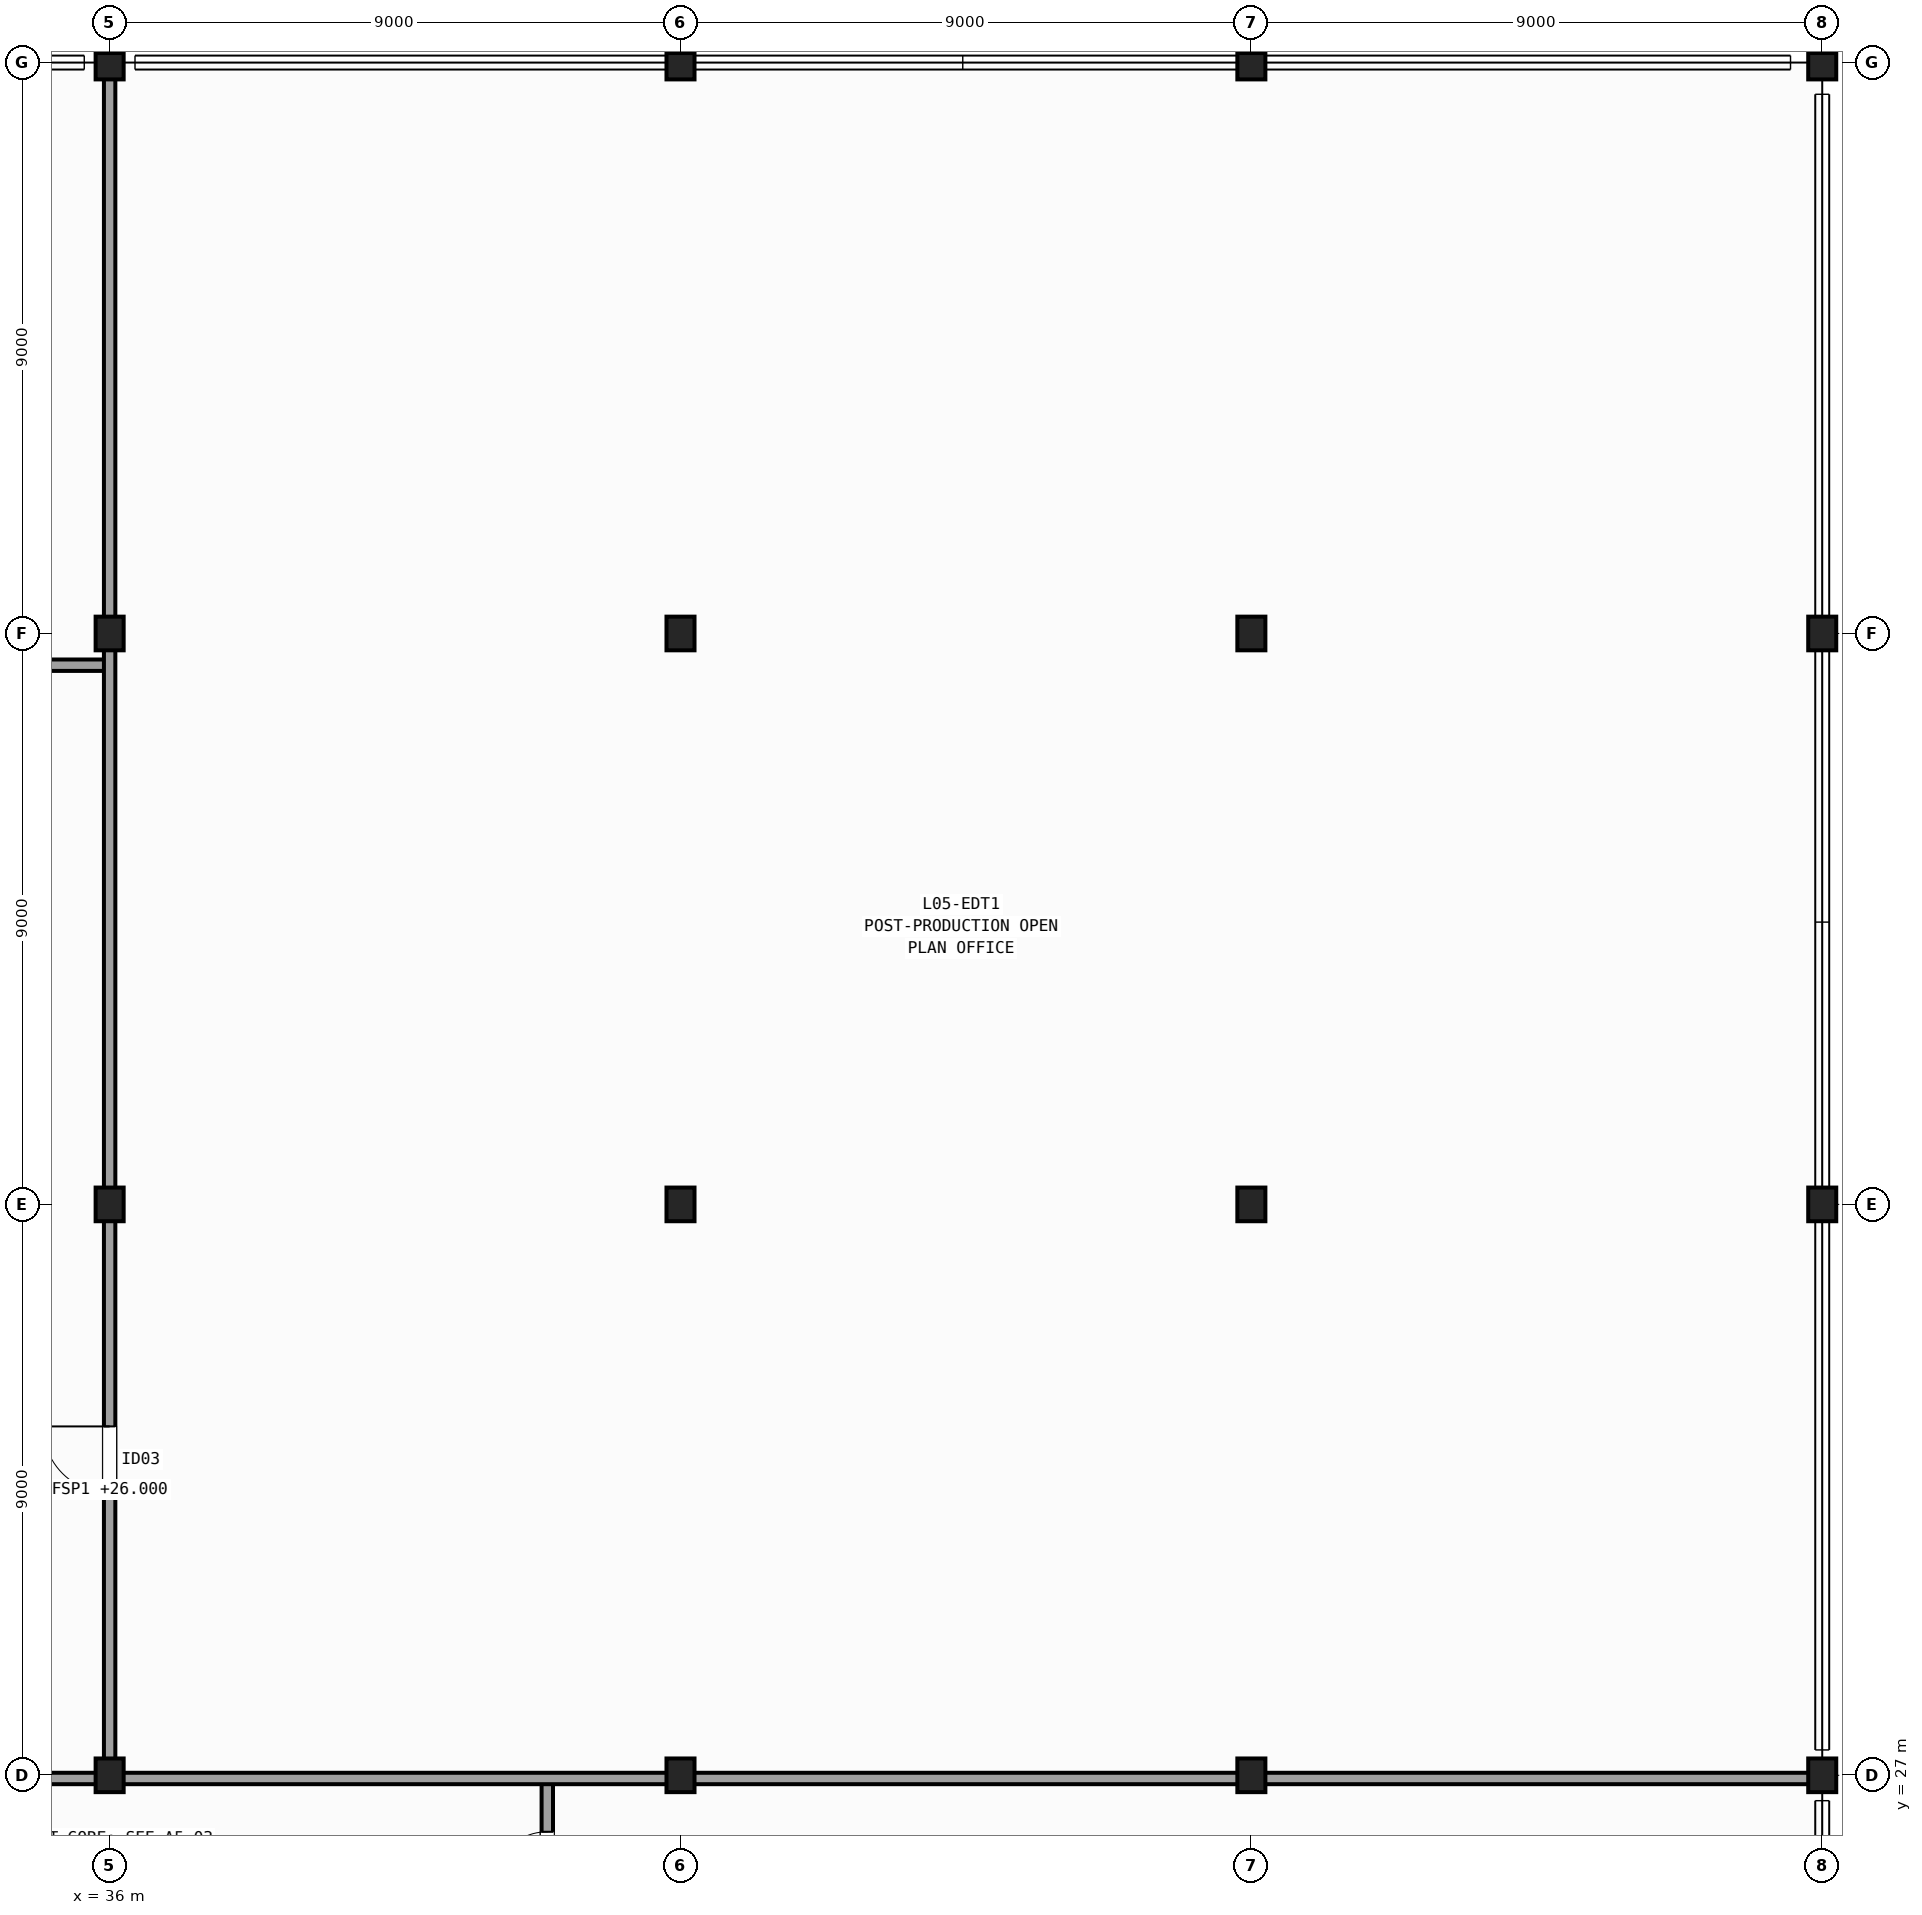
"""IFC4 building model, lengths in metres.
Left out: names, types, materials, properties, quantities, classifications, styles, units other than length and angle.
Written with IfcOpenShell. Run it as: python <this file> out.ifc"""

import sys

from ifc_helpers import new_model, si_unit, direction, frame, frame_2d, origin, origin_2d, place, context, subcontext, project, spatial, rectangle, i_section, extrude, element, fill, save


model = new_model("IFC4")
c1 = context("Model", 3, precision=1e-05, world=origin(), true_north=direction((0.0, 1.0)))
c2 = subcontext(c1, "Body", "Model", "MODEL_VIEW")
j1 = project(units=[si_unit("LENGTHUNIT", "METRE"), si_unit("PLANEANGLEUNIT", "RADIAN")], contexts=[c1])
p1 = place(None, origin())
s1 = spatial("IfcSite", under=j1, at=p1, CompositionType="ELEMENT")
p2 = place(p1, origin())
s2 = spatial("IfcBuilding", under=s1, at=p2, CompositionType="ELEMENT")
p3 = place(p2, frame((0.0, 0.0, 26.0)))
s3 = spatial("IfcBuildingStorey", under=s2, at=p3, CompositionType="ELEMENT", Elevation=26.0)
for number, where, z_axis, x_axis in (
    (1, (36.0, 27.0, 0.0), (0.0, 0.0, 1.0), (1.0, 0.0, 0.0)),
    (2, (36.0, 36.0, 0.0), (0.0, 0.0, 1.0), (1.0, 0.0, 0.0)),
    (3, (36.0, 45.0, 0.0), (0.0, 0.0, 1.0), (1.0, 0.0, 0.0)),
    (4, (36.0, 54.0, 0.0), (0.0, 0.0, 1.0), (1.0, 0.0, 0.0)),
    (5, (45.0, 27.0, 0.0), (0.0, 0.0, 1.0), (1.0, 0.0, 0.0)),
    (6, (45.0, 36.0, 0.0), (0.0, 0.0, 1.0), (1.0, 0.0, 0.0)),
    (7, (45.0, 45.0, 0.0), (0.0, 0.0, 1.0), (1.0, 0.0, 0.0)),
    (8, (45.0, 54.0, 0.0), (0.0, 0.0, 1.0), (1.0, 0.0, 0.0)),
    (9, (54.0, 27.0, 0.0), (0.0, 0.0, 1.0), (1.0, 0.0, 0.0)),
    (10, (54.0, 36.0, 0.0), (0.0, 0.0, 1.0), (1.0, 0.0, 0.0)),
    (11, (54.0, 45.0, 0.0), (0.0, 0.0, 1.0), (1.0, 0.0, 0.0)),
    (12, (54.0, 54.0, 0.0), (0.0, 0.0, 1.0), (1.0, 0.0, 0.0)),
    (13, (63.0, 27.0, 0.0), (0.0, 0.0, 1.0), (1.0, 0.0, 0.0)),
    (14, (63.0, 36.0, 0.0), (0.0, 0.0, 1.0), (1.0, 0.0, 0.0)),
    (15, (63.0, 45.0, 0.0), (0.0, 0.0, 1.0), (1.0, 0.0, 0.0)),
    (16, (63.0, 54.0, 0.0), (0.0, 0.0, 1.0), (1.0, 0.0, 0.0)),
):
    element("IfcColumn", number, at=place(p3, frame(where, z_axis=z_axis, x_axis=x_axis)), inside=s3, PredefinedType="COLUMN", context=c2, shape_type="SweptSolid", body=[
        extrude(i_section(OverallWidth=0.442, OverallDepth=0.531, WebThickness=0.066, FlangeThickness=0.106, FilletRadius=0.015, at=origin_2d()), origin(), (0.0, 0.0, 1.0), 4.8),
    ])
p4 = place(p3, frame((42.9, 24.6, 0.0), z_axis=(0.0, 0.0, 1.0), x_axis=(0.0, 1.0, 0.0)))
e17 = element("IfcWall", 17, at=p4, inside=s3, PredefinedType="PARTITIONING", context=c2, shape_type="SweptSolid", body=[
    extrude(rectangle(XDim=2.35, YDim=0.18, at=frame_2d((1.175, 0.0))), origin(), (0.0, 0.0, 1.0), 3.493),
])
p5 = place(p4, frame((0.65, 0.0, 0.0)))
e18 = element("IfcOpeningElement", 18, at=p5, cuts=e17, PredefinedType="OPENING", context=c2, shape_type="SweptSolid", body=[
    extrude(rectangle(XDim=0.86, YDim=2.05, at=frame_2d((0.43, 1.025))), frame((0.0, 0.1, 0.0), z_axis=(0.0, -1.0, 0.0), x_axis=(1.0, 0.0, 0.0)), (0.0, 0.0, 1.0), 0.2),
])
p6 = place(p3, frame((27.1, 26.95, 0.0), z_axis=(0.0, 0.0, 1.0), x_axis=(1.0, 0.0, 0.0)))
e19 = element("IfcWall", 19, at=p6, inside=s3, PredefinedType="PARTITIONING", context=c2, shape_type="SweptSolid", body=[
    extrude(rectangle(XDim=35.9, YDim=0.18, at=frame_2d((17.95, 0.0))), origin(), (0.0, 0.0, 1.0), 2.62),
])
p7 = place(p3, frame((11.1, 44.5, 0.0), z_axis=(0.0, 0.0, 1.0), x_axis=(1.0, 0.0, 0.0)))
e20 = element("IfcWall", 20, at=p7, inside=s3, PredefinedType="PARTITIONING", context=c2, shape_type="SweptSolid", body=[
    extrude(rectangle(XDim=24.9, YDim=0.18, at=frame_2d((12.45, 0.0))), origin(), (0.0, 0.0, 1.0), 3.565),
])
p8 = place(p7, frame((4.5, 0.0, 0.0)))
e21 = element("IfcOpeningElement", 21, at=p8, cuts=e20, PredefinedType="OPENING", context=c2, shape_type="SweptSolid", body=[
    extrude(rectangle(XDim=1.0, YDim=2.1, at=frame_2d((0.5, 1.05))), frame((0.0, 0.1, 0.0), z_axis=(0.0, -1.0, 0.0), x_axis=(1.0, 0.0, 0.0)), (0.0, 0.0, 1.0), 0.2),
])
p9 = place(p3, frame((36.0, 26.95, 0.0), z_axis=(0.0, 0.0, 1.0), x_axis=(0.0, 1.0, 0.0)))
e22 = element("IfcWall", 22, at=p9, inside=s3, PredefinedType="PARTITIONING", context=c2, shape_type="SweptSolid", body=[
    extrude(rectangle(XDim=27.05, YDim=0.18, at=frame_2d((13.525, 0.0))), origin(), (0.0, 0.0, 1.0), 3.493),
])
p10 = place(p9, frame((4.5, 0.0, 0.0)))
e23 = element("IfcOpeningElement", 23, at=p10, cuts=e22, PredefinedType="OPENING", context=c2, shape_type="SweptSolid", body=[
    extrude(rectangle(XDim=1.05, YDim=2.15, at=frame_2d((0.525, 1.075))), frame((0.0, 0.1, 0.0), z_axis=(0.0, -1.0, 0.0), x_axis=(1.0, 0.0, 0.0)), (0.0, 0.0, 1.0), 0.2),
])
p11 = place(p5, origin())
e24 = element("IfcDoor", 24, at=p11, inside=s3, OperationType="SINGLE_SWING_LEFT", PredefinedType="DOOR", context=c2, shape_type="SweptSolid", body=[
    extrude(rectangle(XDim=0.86, YDim=2.05, at=frame_2d((0.43, 1.025))), frame((0.0, 0.025, 0.0), z_axis=(0.0, -1.0, 0.0), x_axis=(1.0, 0.0, 0.0)), (0.0, 0.0, 1.0), 0.05),
])
fill(e18, e24)
p12 = place(p10, origin())
e25 = element("IfcDoor", 25, at=p12, inside=s3, OperationType="SINGLE_SWING_RIGHT", PredefinedType="DOOR", context=c2, shape_type="SweptSolid", body=[
    extrude(rectangle(XDim=1.05, YDim=2.15, at=frame_2d((0.525, 1.075))), frame((0.0, 0.025, 0.0), z_axis=(0.0, -1.0, 0.0), x_axis=(1.0, 0.0, 0.0)), (0.0, 0.0, 1.0), 0.05),
])
fill(e23, e25)
save(model, sys.argv[1])
